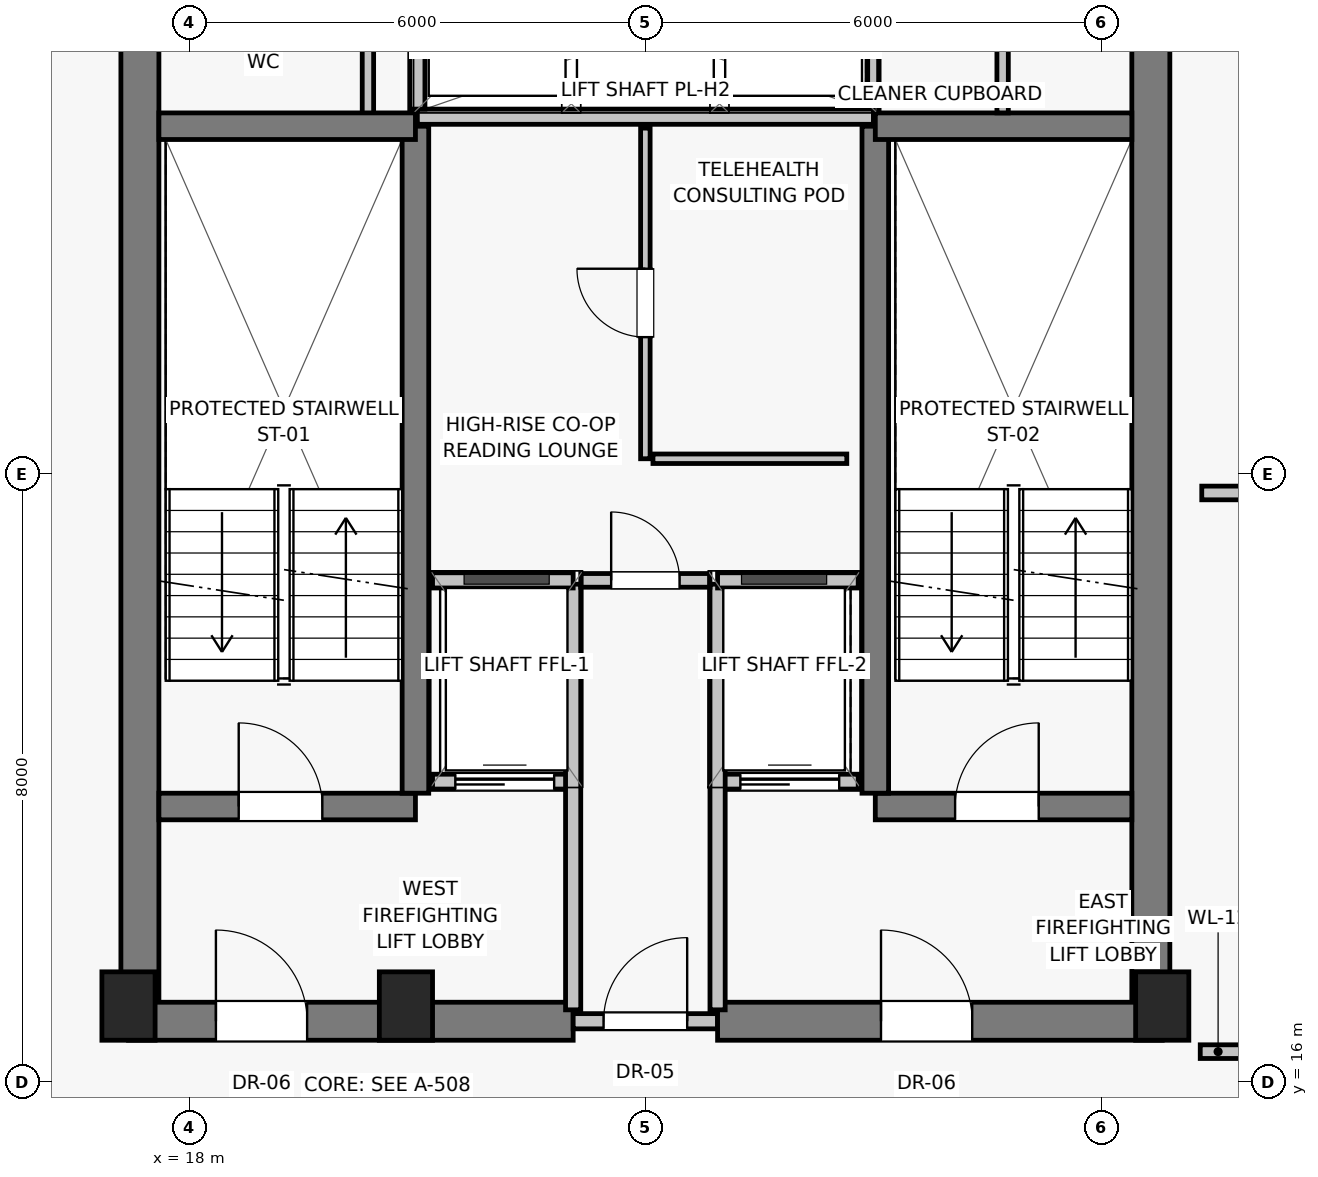
"""IFC4 building model, lengths in metres.
Left out: names, types, materials, properties, quantities, classifications, styles, units other than length and angle.
Written with IfcOpenShell. Run it as: python <this file> out.ifc"""

import sys

from ifc_helpers import new_model, si_unit, direction, frame, frame_2d, origin, origin_2d, place, context, subcontext, project, spatial, rectangle, extrude, source, transform, mapped, element, fill, save


model = new_model("IFC4")
c1 = context("Model", 3, precision=1e-05, world=origin(), true_north=direction((0.0, 1.0)))
c2 = subcontext(c1, "Body", "Model", "MODEL_VIEW")
j1 = project(units=[si_unit("LENGTHUNIT", "METRE"), si_unit("PLANEANGLEUNIT", "RADIAN")], contexts=[c1])
p1 = place(None, origin())
s1 = spatial("IfcSite", under=j1, at=p1, CompositionType="ELEMENT")
p2 = place(p1, origin())
s2 = spatial("IfcBuilding", under=s1, at=p2, CompositionType="ELEMENT")
p3 = place(p2, frame((0.0, 0.0, 195.1)))
s3 = spatial("IfcBuildingStorey", under=s2, at=p3, CompositionType="ELEMENT", Elevation=195.1)
for number, where, z_axis, x_axis in (
    (1, (17.2, 17.0, 0.0), (0.0, 0.0, 1.0), (1.0, 0.0, 0.0)),
    (2, (20.85, 17.0, 0.0), (0.0, 0.0, 1.0), (1.0, 0.0, 0.0)),
    (3, (30.8, 17.0, 0.0), (0.0, 0.0, 1.0), (1.0, 0.0, 0.0)),
):
    element("IfcColumn", number, at=place(p3, frame(where, z_axis=z_axis, x_axis=x_axis)), inside=s3, PredefinedType="PILASTER", context=c2, shape_type="SweptSolid", body=[
        extrude(rectangle(XDim=0.7, YDim=0.9, at=origin_2d()), origin(), (0.0, 0.0, 1.0), 3.25),
    ])
for number, where, z_axis, x_axis in (
    (4, (17.35, 16.8, 0.0), (0.0, 0.0, 1.0), (0.0, 1.0, 0.0)),
    (5, (30.65, 16.8, 0.0), (0.0, 0.0, 1.0), (0.0, 1.0, 0.0)),
):
    element("IfcWall", number, at=place(p3, frame(where, z_axis=z_axis, x_axis=x_axis)), inside=s3, PredefinedType="SHEAR", context=c2, shape_type="SweptSolid", body=[
        extrude(rectangle(XDim=14.2, YDim=0.5, at=frame_2d((7.1, 0.0))), origin(), (0.0, 0.0, 1.0), 3.015),
    ])
p4 = place(p3, frame((17.2, 16.8, 0.0), z_axis=(0.0, 0.0, 1.0), x_axis=(1.0, 0.0, 0.0)))
e6 = element("IfcWall", 6, at=p4, inside=s3, PredefinedType="SHEAR", context=c2, shape_type="SweptSolid", body=[
    extrude(rectangle(XDim=5.85, YDim=0.5, at=frame_2d((2.925, 0.0))), origin(), (0.0, 0.0, 1.0), 3.015),
])
p5 = place(p4, frame((1.15, 0.0, 0.0)))
e7 = element("IfcOpeningElement", 7, at=p5, cuts=e6, PredefinedType="OPENING", context=c2, shape_type="SweptSolid", body=[
    extrude(rectangle(XDim=1.2, YDim=2.03, at=frame_2d((0.6, 1.015))), frame((0.0, 0.26, 0.0), z_axis=(0.0, -1.0, 0.0), x_axis=(1.0, 0.0, 0.0)), (0.0, 0.0, 1.0), 0.52),
])
p6 = place(p3, frame((23.05, 16.8, 0.0), z_axis=(0.0, 0.0, 1.0), x_axis=(1.0, 0.0, 0.0)))
e8 = element("IfcWall", 8, at=p6, inside=s3, PredefinedType="SOLIDWALL", context=c2, shape_type="SweptSolid", body=[
    extrude(rectangle(XDim=1.9, YDim=0.2, at=frame_2d((0.95, 0.0))), origin(), (0.0, 0.0, 1.0), 2.165),
])
p7 = place(p6, frame((0.4, 0.0, 0.0)))
e9 = element("IfcOpeningElement", 9, at=p7, cuts=e8, PredefinedType="OPENING", context=c2, shape_type="SweptSolid", body=[
    extrude(rectangle(XDim=1.1, YDim=2.03, at=frame_2d((0.55, 1.015))), frame((0.0, 0.11, 0.0), z_axis=(0.0, -1.0, 0.0), x_axis=(1.0, 0.0, 0.0)), (0.0, 0.0, 1.0), 0.22),
])
p8 = place(p3, frame((24.95, 16.8, 0.0), z_axis=(0.0, 0.0, 1.0), x_axis=(1.0, 0.0, 0.0)))
e10 = element("IfcWall", 10, at=p8, inside=s3, PredefinedType="SHEAR", context=c2, shape_type="SweptSolid", body=[
    extrude(rectangle(XDim=5.85, YDim=0.5, at=frame_2d((2.925, 0.0))), origin(), (0.0, 0.0, 1.0), 3.015),
])
p9 = place(p8, frame((2.15, 0.0, 0.0)))
e11 = element("IfcOpeningElement", 11, at=p9, cuts=e10, PredefinedType="OPENING", context=c2, shape_type="SweptSolid", body=[
    extrude(rectangle(XDim=1.2, YDim=2.03, at=frame_2d((0.6, 1.015))), frame((0.0, 0.26, 0.0), z_axis=(0.0, -1.0, 0.0), x_axis=(1.0, 0.0, 0.0)), (0.0, 0.0, 1.0), 0.52),
])
for number, where, z_axis, x_axis in (
    (12, (20.35, 28.65, 0.0), (0.0, 0.0, 1.0), (0.0, 1.0, 0.0)),
    (13, (27.0, 28.65, 0.0), (0.0, 0.0, 1.0), (0.0, 1.0, 0.0)),
):
    element("IfcWall", number, at=place(p3, frame(where, z_axis=z_axis, x_axis=x_axis)), inside=s3, PredefinedType="PARTITIONING", context=c2, shape_type="SweptSolid", body=[
        extrude(rectangle(XDim=2.2, YDim=0.15, at=frame_2d((1.1, 0.0))), origin(), (0.0, 0.0, 1.0), 3.015),
    ])
p10 = place(p3, frame((17.6, 19.625, 0.0), z_axis=(0.0, 0.0, 1.0), x_axis=(1.0, 0.0, 0.0)))
e14 = element("IfcWall", 14, at=p10, inside=s3, PredefinedType="SHEAR", context=c2, shape_type="SweptSolid", body=[
    extrude(rectangle(XDim=3.375, YDim=0.35, at=frame_2d((1.688, 0.0))), origin(), (0.0, 0.0, 1.0), 3.015),
])
p11 = place(p10, frame((1.05, 0.0, 0.0)))
e15 = element("IfcOpeningElement", 15, at=p11, cuts=e14, PredefinedType="OPENING", context=c2, shape_type="SweptSolid", body=[
    extrude(rectangle(XDim=1.1, YDim=2.03, at=frame_2d((0.55, 1.015))), frame((0.0, 0.185, 0.0), z_axis=(0.0, -1.0, 0.0), x_axis=(1.0, 0.0, 0.0)), (0.0, 0.0, 1.0), 0.37),
])
p12 = place(p3, frame((21.2, 19.95, 0.0), z_axis=(0.0, 0.0, 1.0), x_axis=(1.0, 0.0, 0.0)))
e16 = element("IfcWall", 16, at=p12, inside=s3, PredefinedType="SOLIDWALL", context=c2, shape_type="SweptSolid", body=[
    extrude(rectangle(XDim=1.85, YDim=0.2, at=frame_2d((0.925, 0.0))), origin(), (0.0, 0.0, 1.0), 3.015),
])
p13 = place(p12, frame((0.3, 0.0, 0.0)))
e17 = element("IfcOpeningElement", 17, at=p13, cuts=e16, PredefinedType="OPENING", context=c2, shape_type="SweptSolid", body=[
    extrude(rectangle(XDim=1.3, YDim=2.25, at=frame_2d((0.65, 1.125))), frame((0.0, 0.11, 0.0), z_axis=(0.0, -1.0, 0.0), x_axis=(1.0, 0.0, 0.0)), (0.0, 0.0, 1.0), 0.22),
])
p14 = place(p3, frame((24.95, 19.95, 0.0), z_axis=(0.0, 0.0, 1.0), x_axis=(1.0, 0.0, 0.0)))
e18 = element("IfcWall", 18, at=p14, inside=s3, PredefinedType="SOLIDWALL", context=c2, shape_type="SweptSolid", body=[
    extrude(rectangle(XDim=1.85, YDim=0.2, at=frame_2d((0.925, 0.0))), origin(), (0.0, 0.0, 1.0), 3.015),
])
p15 = place(p14, frame((0.3, 0.0, 0.0)))
e19 = element("IfcOpeningElement", 19, at=p15, cuts=e18, PredefinedType="OPENING", context=c2, shape_type="SweptSolid", body=[
    extrude(rectangle(XDim=1.3, YDim=2.25, at=frame_2d((0.65, 1.125))), frame((0.0, 0.11, 0.0), z_axis=(0.0, -1.0, 0.0), x_axis=(1.0, 0.0, 0.0)), (0.0, 0.0, 1.0), 0.22),
])
p16 = place(p3, frame((27.025, 19.625, 0.0), z_axis=(0.0, 0.0, 1.0), x_axis=(1.0, 0.0, 0.0)))
e20 = element("IfcWall", 20, at=p16, inside=s3, PredefinedType="SHEAR", context=c2, shape_type="SweptSolid", body=[
    extrude(rectangle(XDim=3.375, YDim=0.35, at=frame_2d((1.688, 0.0))), origin(), (0.0, 0.0, 1.0), 3.015),
])
p17 = place(p16, frame((1.05, 0.0, 0.0)))
e21 = element("IfcOpeningElement", 21, at=p17, cuts=e20, PredefinedType="OPENING", context=c2, shape_type="SweptSolid", body=[
    extrude(rectangle(XDim=1.1, YDim=2.03, at=frame_2d((0.55, 1.015))), frame((0.0, 0.185, 0.0), z_axis=(0.0, -1.0, 0.0), x_axis=(1.0, 0.0, 0.0)), (0.0, 0.0, 1.0), 0.37),
])
for number, where, z_axis, x_axis in (
    (22, (20.975, 19.8, 0.0), (0.0, 0.0, 1.0), (0.0, 1.0, 0.0)),
    (23, (27.025, 19.8, 0.0), (0.0, 0.0, 1.0), (0.0, 1.0, 0.0)),
):
    element("IfcWall", number, at=place(p3, frame(where, z_axis=z_axis, x_axis=x_axis)), inside=s3, PredefinedType="SHEAR", context=c2, shape_type="SweptSolid", body=[
        extrude(rectangle(XDim=8.775, YDim=0.35, at=frame_2d((4.387, 0.0))), origin(), (0.0, 0.0, 1.0), 3.015),
    ])
for number, where, z_axis, x_axis in (
    (24, (17.6, 28.575, 0.0), (0.0, 0.0, 1.0), (1.0, 0.0, 0.0)),
    (25, (27.025, 28.575, 0.0), (0.0, 0.0, 1.0), (1.0, 0.0, 0.0)),
):
    element("IfcWall", number, at=place(p3, frame(where, z_axis=z_axis, x_axis=x_axis)), inside=s3, PredefinedType="SHEAR", context=c2, shape_type="SweptSolid", body=[
        extrude(rectangle(XDim=3.375, YDim=0.35, at=frame_2d((1.688, 0.0))), origin(), (0.0, 0.0, 1.0), 3.015),
    ])
for number, where, z_axis, x_axis in (
    (26, (23.05, 16.95, 0.0), (0.0, 0.0, 1.0), (0.0, 1.0, 0.0)),
    (27, (24.95, 16.95, 0.0), (0.0, 0.0, 1.0), (0.0, 1.0, 0.0)),
):
    element("IfcWall", number, at=place(p3, frame(where, z_axis=z_axis, x_axis=x_axis)), inside=s3, PredefinedType="SOLIDWALL", context=c2, shape_type="SweptSolid", body=[
        extrude(rectangle(XDim=5.6, YDim=0.2, at=frame_2d((2.8, 0.0))), origin(), (0.0, 0.0, 1.0), 3.015),
    ])
for number, where, z_axis, x_axis in (
    (28, (21.2, 22.6, 0.0), (0.0, 0.0, 1.0), (1.0, 0.0, 0.0)),
    (29, (24.95, 22.6, 0.0), (0.0, 0.0, 1.0), (1.0, 0.0, 0.0)),
):
    element("IfcWall", number, at=place(p3, frame(where, z_axis=z_axis, x_axis=x_axis)), inside=s3, PredefinedType="SOLIDWALL", context=c2, shape_type="SweptSolid", body=[
        extrude(rectangle(XDim=1.85, YDim=0.2, at=frame_2d((0.925, 0.0))), origin(), (0.0, 0.0, 1.0), 3.015),
    ])
p18 = place(p3, frame((21.0, 28.7, 0.0), z_axis=(0.0, 0.0, 1.0), x_axis=(1.0, 0.0, 0.0)))
e30 = element("IfcWall", 30, at=p18, inside=s3, PredefinedType="SOLIDWALL", context=c2, shape_type="SweptSolid", body=[
    extrude(rectangle(XDim=6.0, YDim=0.2, at=frame_2d((3.0, 0.0))), origin(), (0.0, 0.0, 1.0), 3.015),
])
p19 = place(p3, frame((21.0, 28.8, 0.0), z_axis=(0.0, 0.0, 1.0), x_axis=(0.0, 1.0, 0.0)))
e31 = element("IfcWall", 31, at=p19, inside=s3, PredefinedType="SOLIDWALL", context=c2, shape_type="SweptSolid", body=[
    extrude(rectangle(XDim=1.6, YDim=0.2, at=frame_2d((0.8, 0.0))), origin(), (0.0, 0.0, 1.0), 3.015),
])
p20 = place(p3, frame((23.15, 22.6, 0.0), z_axis=(0.0, 0.0, 1.0), x_axis=(1.0, 0.0, 0.0)))
e32 = element("IfcWall", 32, at=p20, inside=s3, PredefinedType="PARTITIONING", context=c2, shape_type="SweptSolid", body=[
    extrude(rectangle(XDim=1.7, YDim=0.18, at=frame_2d((0.85, 0.0))), origin(), (0.0, 0.0, 1.0), 3.015),
])
p21 = place(p20, frame((0.4, 0.0, 0.0)))
e33 = element("IfcOpeningElement", 33, at=p21, cuts=e32, PredefinedType="OPENING", context=c2, shape_type="SweptSolid", body=[
    extrude(rectangle(XDim=0.9, YDim=2.01, at=frame_2d((0.45, 1.005))), frame((0.0, 0.1, 0.0), z_axis=(0.0, -1.0, 0.0), x_axis=(1.0, 0.0, 0.0)), (0.0, 0.0, 1.0), 0.2),
])
p22 = place(p3, frame((24.1, 24.2, 0.0), z_axis=(0.0, 0.0, 1.0), x_axis=(1.0, 0.0, 0.0)))
e34 = element("IfcWall", 34, at=p22, inside=s3, PredefinedType="PARTITIONING", context=c2, shape_type="SweptSolid", body=[
    extrude(rectangle(XDim=2.55, YDim=0.125, at=frame_2d((1.275, 0.0))), origin(), (0.0, 0.0, 1.0), 3.015),
])
p23 = place(p3, frame((24.0, 24.2, 0.0), z_axis=(0.0, 0.0, 1.0), x_axis=(0.0, 1.0, 0.0)))
e35 = element("IfcWall", 35, at=p23, inside=s3, PredefinedType="PARTITIONING", context=c2, shape_type="SweptSolid", body=[
    extrude(rectangle(XDim=4.35, YDim=0.125, at=frame_2d((2.175, 0.0))), origin(), (0.0, 0.0, 1.0), 3.015),
])
p24 = place(p23, frame((1.6, 0.0, 0.0)))
e36 = element("IfcOpeningElement", 36, at=p24, cuts=e35, PredefinedType="OPENING", context=c2, shape_type="SweptSolid", body=[
    extrude(rectangle(XDim=0.9, YDim=2.01, at=frame_2d((0.45, 1.005))), frame((0.0, 0.073, 0.0), z_axis=(0.0, -1.0, 0.0), x_axis=(1.0, 0.0, 0.0)), (0.0, 0.0, 1.0), 0.145),
])
p25 = place(p3, frame((28.7, 28.75, 0.0), z_axis=(0.0, 0.0, 1.0), x_axis=(0.0, 1.0, 0.0)))
e37 = element("IfcWall", 37, at=p25, inside=s3, PredefinedType="PARTITIONING", context=c2, shape_type="SweptSolid", body=[
    extrude(rectangle(XDim=2.0, YDim=0.15, at=frame_2d((1.0, 0.0))), origin(), (0.0, 0.0, 1.0), 3.015),
])
p26 = place(p3, frame((31.32, 23.75, 0.0), z_axis=(0.0, 0.0, 1.0), x_axis=(1.0, 0.0, 0.0)))
e38 = element("IfcWall", 38, at=p26, inside=s3, PredefinedType="PARTITIONING", context=c2, shape_type="SweptSolid", body=[
    extrude(rectangle(XDim=10.464, YDim=0.18, at=frame_2d((5.232, 0.0))), origin(), (0.0, 0.0, 1.0), 3.015),
])
p27 = place(p3, frame((31.3, 16.4, 0.0), z_axis=(0.0, 0.0, 1.0), x_axis=(1.0, 0.0, 0.0)))
e39 = element("IfcWall", 39, at=p27, inside=s3, PredefinedType="PARTITIONING", context=c2, shape_type="SweptSolid", body=[
    extrude(rectangle(XDim=1.92, YDim=0.18, at=frame_2d((0.96, 0.0))), origin(), (0.0, 0.0, 1.0), 3.015),
])
p28 = place(p27, frame((0.72, 0.0, 0.0)))
e40 = element("IfcOpeningElement", 40, at=p28, cuts=e39, PredefinedType="OPENING", context=c2, shape_type="SweptSolid", body=[
    extrude(rectangle(XDim=1.0, YDim=2.01, at=frame_2d((0.5, 1.005))), frame((0.0, 0.1, 0.0), z_axis=(0.0, -1.0, 0.0), x_axis=(1.0, 0.0, 0.0)), (0.0, 0.0, 1.0), 0.2),
])
m1 = source(origin(), c2, "Body", "SweptSolid", [
    extrude(rectangle(XDim=1.2, YDim=2.03, at=frame_2d((0.6, 1.015))), frame((0.0, 0.025, 0.0), z_axis=(0.0, -1.0, 0.0), x_axis=(1.0, 0.0, 0.0)), (0.0, 0.0, 1.0), 0.05),
])
p29 = place(p5, origin())
e41 = element("IfcDoor", 41, at=p29, inside=s3, OperationType="SINGLE_SWING_LEFT", PredefinedType="DOOR", context=c2, shape_type="MappedRepresentation", body=[
    mapped(m1, transform((0.0, 0.0, 0.0), scale=1.0)),
])
fill(e7, e41)
m2 = source(origin(), c2, "Body", "SweptSolid", [
    extrude(rectangle(XDim=1.1, YDim=2.03, at=frame_2d((0.55, 1.015))), frame((0.0, 0.025, 0.0), z_axis=(0.0, -1.0, 0.0), x_axis=(1.0, 0.0, 0.0)), (0.0, 0.0, 1.0), 0.05),
])
p30 = place(p7, origin())
e42 = element("IfcDoor", 42, at=p30, inside=s3, OperationType="SINGLE_SWING_RIGHT", PredefinedType="DOOR", context=c2, shape_type="MappedRepresentation", body=[
    mapped(m2, transform((0.0, 0.0, 0.0), scale=1.0)),
])
fill(e9, e42)
p31 = place(p9, origin())
e43 = element("IfcDoor", 43, at=p31, inside=s3, OperationType="SINGLE_SWING_LEFT", PredefinedType="DOOR", context=c2, shape_type="MappedRepresentation", body=[
    mapped(m1, transform((0.0, 0.0, 0.0), scale=1.0)),
])
fill(e11, e43)
p32 = place(p11, origin())
e44 = element("IfcDoor", 44, at=p32, inside=s3, OperationType="SINGLE_SWING_LEFT", PredefinedType="DOOR", context=c2, shape_type="MappedRepresentation", body=[
    mapped(m2, transform((0.0, 0.0, 0.0), scale=1.0)),
])
fill(e15, e44)
m3 = source(origin(), c2, "Body", "SweptSolid", [
    extrude(rectangle(XDim=1.3, YDim=2.25, at=frame_2d((0.65, 1.125))), frame((0.0, 0.025, 0.0), z_axis=(0.0, -1.0, 0.0), x_axis=(1.0, 0.0, 0.0)), (0.0, 0.0, 1.0), 0.05),
])
p33 = place(p13, origin())
e45 = element("IfcDoor", 45, at=p33, inside=s3, OperationType="SLIDING_TO_LEFT", PredefinedType="DOOR", context=c2, shape_type="MappedRepresentation", body=[
    mapped(m3, transform((0.0, 0.0, 0.0), scale=1.0)),
])
fill(e17, e45)
p34 = place(p15, origin())
e46 = element("IfcDoor", 46, at=p34, inside=s3, OperationType="SLIDING_TO_LEFT", PredefinedType="DOOR", context=c2, shape_type="MappedRepresentation", body=[
    mapped(m3, transform((0.0, 0.0, 0.0), scale=1.0)),
])
fill(e19, e46)
p35 = place(p17, origin())
e47 = element("IfcDoor", 47, at=p35, inside=s3, OperationType="SINGLE_SWING_RIGHT", PredefinedType="DOOR", context=c2, shape_type="MappedRepresentation", body=[
    mapped(m2, transform((0.0, 0.0, 0.0), scale=1.0)),
])
fill(e21, e47)
m4 = source(origin(), c2, "Body", "SweptSolid", [
    extrude(rectangle(XDim=0.9, YDim=2.01, at=frame_2d((0.45, 1.005))), frame((0.0, 0.025, 0.0), z_axis=(0.0, -1.0, 0.0), x_axis=(1.0, 0.0, 0.0)), (0.0, 0.0, 1.0), 0.05),
])
p36 = place(p21, origin())
e48 = element("IfcDoor", 48, at=p36, inside=s3, OperationType="SINGLE_SWING_LEFT", PredefinedType="DOOR", context=c2, shape_type="MappedRepresentation", body=[
    mapped(m4, transform((0.0, 0.0, 0.0), scale=1.0)),
])
fill(e33, e48)
p37 = place(p24, origin())
e49 = element("IfcDoor", 49, at=p37, inside=s3, OperationType="SINGLE_SWING_RIGHT", PredefinedType="DOOR", context=c2, shape_type="MappedRepresentation", body=[
    mapped(m4, transform((0.0, 0.0, 0.0), scale=1.0)),
])
fill(e36, e49)
save(model, sys.argv[1])
